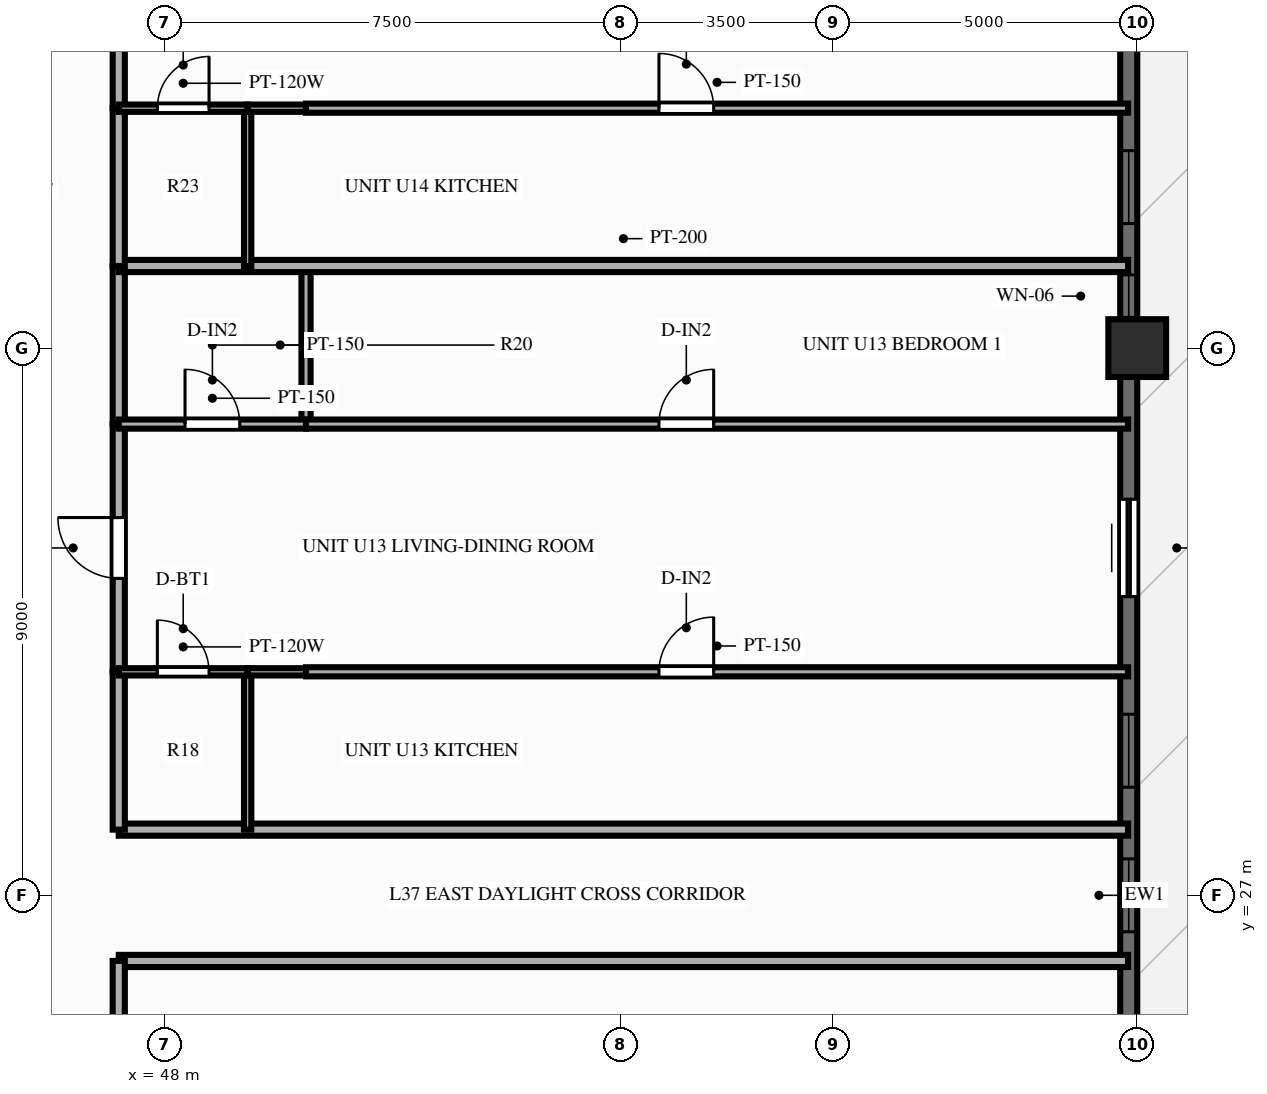
"""IFC4 building model, lengths in metres.
Left out: names, types, materials, properties, quantities, classifications, styles, units other than length and angle.
Written with IfcOpenShell. Run it as: python <this file> out.ifc"""

import sys

from ifc_helpers import new_model, si_unit, direction, frame, frame_2d, origin, origin_2d, place, context, subcontext, project, spatial, rectangle, extrude, source, transform, mapped, element, fill, save


model = new_model("IFC4")
c1 = context("Model", 3, precision=1e-05, world=origin(), true_north=direction((0.0, 1.0)))
c2 = subcontext(c1, "Body", "Model", "MODEL_VIEW")
j1 = project(units=[si_unit("LENGTHUNIT", "METRE"), si_unit("PLANEANGLEUNIT", "RADIAN")], contexts=[c1])
p1 = place(None, origin())
s1 = spatial("IfcSite", under=j1, at=p1, CompositionType="ELEMENT")
p2 = place(p1, origin())
s2 = spatial("IfcBuilding", under=s1, at=p2, CompositionType="ELEMENT")
p3 = place(p2, frame((0.0, 0.0, 116.85)))
s3 = spatial("IfcBuildingStorey", under=s2, at=p3, CompositionType="ELEMENT", Elevation=116.85)
m1 = source(origin(), c2, "Body", "SweptSolid", [
    extrude(rectangle(XDim=0.95, YDim=0.95, at=origin_2d()), origin(), (0.0, 0.0, 1.0), 3.0),
])
p4 = place(p3, frame((64.0, 36.0, 0.0), z_axis=(0.0, 0.0, 1.0), x_axis=(1.0, 0.0, 0.0)))
e1 = element("IfcColumn", 1, at=p4, inside=s3, PredefinedType="COLUMN", context=c2, shape_type="MappedRepresentation", body=[
    mapped(m1, transform((0.0, 0.0, 0.0), scale=1.0)),
])
p5 = place(p3, frame((63.86, 7.2, 0.0), z_axis=(0.0, 0.0, 1.0), x_axis=(0.0, 1.0, 0.0)))
e2 = element("IfcWall", 2, at=p5, inside=s3, PredefinedType="SOLIDWALL", context=c2, shape_type="SweptSolid", body=[
    extrude(rectangle(XDim=39.6, YDim=0.28, at=frame_2d((19.8, 0.0))), origin(), (0.0, 0.0, 1.0), 2.28),
])
p6 = place(p5, frame((1.56, 0.0, 0.25)))
e3 = element("IfcOpeningElement", 3, at=p6, cuts=e2, PredefinedType="OPENING", context=c2, shape_type="SweptSolid", body=[
    extrude(rectangle(XDim=1.2, YDim=1.5, at=frame_2d((0.6, 0.75))), frame((0.0, 0.152, 0.0), z_axis=(0.0, -1.0, 0.0), x_axis=(1.0, 0.0, 0.0)), (0.0, 0.0, 1.0), 0.304),
])
p7 = place(p5, frame((4.829, 0.0, 0.25)))
e4 = element("IfcOpeningElement", 4, at=p7, cuts=e2, PredefinedType="OPENING", context=c2, shape_type="SweptSolid", body=[
    extrude(rectangle(XDim=1.2, YDim=1.5, at=frame_2d((0.6, 0.75))), frame((0.0, 0.152, 0.0), z_axis=(0.0, -1.0, 0.0), x_axis=(1.0, 0.0, 0.0)), (0.0, 0.0, 1.0), 0.304),
])
p8 = place(p5, frame((7.567, 0.0, 0.25)))
e5 = element("IfcOpeningElement", 5, at=p8, cuts=e2, PredefinedType="OPENING", context=c2, shape_type="SweptSolid", body=[
    extrude(rectangle(XDim=1.2, YDim=1.5, at=frame_2d((0.6, 0.75))), frame((0.0, 0.152, 0.0), z_axis=(0.0, -1.0, 0.0), x_axis=(1.0, 0.0, 0.0)), (0.0, 0.0, 1.0), 0.304),
])
p9 = place(p5, frame((11.476, 0.0, 0.25)))
e6 = element("IfcOpeningElement", 6, at=p9, cuts=e2, PredefinedType="OPENING", context=c2, shape_type="SweptSolid", body=[
    extrude(rectangle(XDim=0.95, YDim=1.5, at=frame_2d((0.475, 0.75))), frame((0.0, 0.152, 0.0), z_axis=(0.0, -1.0, 0.0), x_axis=(1.0, 0.0, 0.0)), (0.0, 0.0, 1.0), 0.304),
])
p10 = place(p5, frame((13.552, 0.0, 0.25)))
e7 = element("IfcOpeningElement", 7, at=p10, cuts=e2, PredefinedType="OPENING", context=c2, shape_type="SweptSolid", body=[
    extrude(rectangle(XDim=1.2, YDim=1.5, at=frame_2d((0.6, 0.75))), frame((0.0, 0.152, 0.0), z_axis=(0.0, -1.0, 0.0), x_axis=(1.0, 0.0, 0.0)), (0.0, 0.0, 1.0), 0.304),
])
p11 = place(p5, frame((16.518, 0.0, 0.25)))
e8 = element("IfcOpeningElement", 8, at=p11, cuts=e2, PredefinedType="OPENING", context=c2, shape_type="SweptSolid", body=[
    extrude(rectangle(XDim=1.2, YDim=1.5, at=frame_2d((0.6, 0.75))), frame((0.0, 0.152, 0.0), z_axis=(0.0, -1.0, 0.0), x_axis=(1.0, 0.0, 0.0)), (0.0, 0.0, 1.0), 0.304),
])
p12 = place(p5, frame((19.2, 0.0, 0.25)))
e9 = element("IfcOpeningElement", 9, at=p12, cuts=e2, PredefinedType="OPENING", context=c2, shape_type="SweptSolid", body=[
    extrude(rectangle(XDim=1.2, YDim=1.5, at=frame_2d((0.6, 0.75))), frame((0.0, 0.152, 0.0), z_axis=(0.0, -1.0, 0.0), x_axis=(1.0, 0.0, 0.0)), (0.0, 0.0, 1.0), 0.304),
])
p13 = place(p5, frame((21.578, 0.0, 0.25)))
e10 = element("IfcOpeningElement", 10, at=p13, cuts=e2, PredefinedType="OPENING", context=c2, shape_type="SweptSolid", body=[
    extrude(rectangle(XDim=1.2, YDim=1.5, at=frame_2d((0.6, 0.75))), frame((0.0, 0.152, 0.0), z_axis=(0.0, -1.0, 0.0), x_axis=(1.0, 0.0, 0.0)), (0.0, 0.0, 1.0), 0.304),
])
p14 = place(p5, frame((26.313, 0.0, 0.0), z_axis=(0.0, 0.0, 1.0), x_axis=(-1.0, 0.0, 0.0)))
e11 = element("IfcOpeningElement", 11, at=p14, cuts=e2, PredefinedType="OPENING", context=c2, shape_type="SweptSolid", body=[
    extrude(rectangle(XDim=1.6, YDim=2.15, at=frame_2d((0.8, 1.075))), frame((0.0, 0.152, 0.0), z_axis=(0.0, -1.0, 0.0), x_axis=(1.0, 0.0, 0.0)), (0.0, 0.0, 1.0), 0.304),
])
p15 = place(p5, frame((29.305, 0.0, 0.25)))
e12 = element("IfcOpeningElement", 12, at=p15, cuts=e2, PredefinedType="OPENING", context=c2, shape_type="SweptSolid", body=[
    extrude(rectangle(XDim=0.7, YDim=1.5, at=frame_2d((0.35, 0.75))), frame((0.0, 0.152, 0.0), z_axis=(0.0, -1.0, 0.0), x_axis=(1.0, 0.0, 0.0)), (0.0, 0.0, 1.0), 0.304),
])
p16 = place(p5, frame((30.848, 0.0, 0.25)))
e13 = element("IfcOpeningElement", 13, at=p16, cuts=e2, PredefinedType="OPENING", context=c2, shape_type="SweptSolid", body=[
    extrude(rectangle(XDim=1.2, YDim=1.5, at=frame_2d((0.6, 0.75))), frame((0.0, 0.152, 0.0), z_axis=(0.0, -1.0, 0.0), x_axis=(1.0, 0.0, 0.0)), (0.0, 0.0, 1.0), 0.304),
])
p17 = place(p5, frame((34.183, 0.0, 0.25)))
e14 = element("IfcOpeningElement", 14, at=p17, cuts=e2, PredefinedType="OPENING", context=c2, shape_type="SweptSolid", body=[
    extrude(rectangle(XDim=1.2, YDim=1.5, at=frame_2d((0.6, 0.75))), frame((0.0, 0.152, 0.0), z_axis=(0.0, -1.0, 0.0), x_axis=(1.0, 0.0, 0.0)), (0.0, 0.0, 1.0), 0.304),
])
p18 = place(p5, frame((37.452, 0.0, 0.25)))
e15 = element("IfcOpeningElement", 15, at=p18, cuts=e2, PredefinedType="OPENING", context=c2, shape_type="SweptSolid", body=[
    extrude(rectangle(XDim=1.2, YDim=1.5, at=frame_2d((0.6, 0.75))), frame((0.0, 0.152, 0.0), z_axis=(0.0, -1.0, 0.0), x_axis=(1.0, 0.0, 0.0)), (0.0, 0.0, 1.0), 0.304),
])
p19 = place(p3, frame((47.25, 25.92, 0.0), z_axis=(0.0, 0.0, 1.0), x_axis=(1.0, 0.0, 0.0)))
e16 = element("IfcWall", 16, at=p19, inside=s3, PredefinedType="PARTITIONING", context=c2, shape_type="SweptSolid", body=[
    extrude(rectangle(XDim=16.6, YDim=0.2, at=frame_2d((8.3, 0.0))), origin(), (0.0, 0.0, 1.0), 2.79),
])
p20 = place(p3, frame((47.25, 22.716, 0.0), z_axis=(0.0, 0.0, 1.0), x_axis=(0.0, 1.0, 0.0)))
e17 = element("IfcWall", 17, at=p20, inside=s3, PredefinedType="PARTITIONING", context=c2, shape_type="SweptSolid", body=[
    extrude(rectangle(XDim=3.204, YDim=0.2, at=frame_2d((1.602, 0.0))), origin(), (0.0, 0.0, 1.0), 2.79),
])
p21 = place(p20, frame((1.102, 0.0, 0.0)))
e18 = element("IfcOpeningElement", 18, at=p21, cuts=e17, PredefinedType="OPENING", context=c2, shape_type="SweptSolid", body=[
    extrude(rectangle(XDim=1.0, YDim=2.15, at=frame_2d((0.5, 1.075))), frame((0.0, 0.112, 0.0), z_axis=(0.0, -1.0, 0.0), x_axis=(1.0, 0.0, 0.0)), (0.0, 0.0, 1.0), 0.224),
])
p22 = place(p3, frame((47.25, 28.08, 0.0), z_axis=(0.0, 0.0, 1.0), x_axis=(1.0, 0.0, 0.0)))
e19 = element("IfcWall", 19, at=p22, inside=s3, PredefinedType="PARTITIONING", context=c2, shape_type="SweptSolid", body=[
    extrude(rectangle(XDim=16.6, YDim=0.2, at=frame_2d((8.3, 0.0))), origin(), (0.0, 0.0, 1.0), 2.79),
])
p23 = place(p3, frame((47.25, 28.08, 0.0), z_axis=(0.0, 0.0, 1.0), x_axis=(0.0, 1.0, 0.0)))
e20 = element("IfcWall", 20, at=p23, inside=s3, PredefinedType="PARTITIONING", context=c2, shape_type="SweptSolid", body=[
    extrude(rectangle(XDim=2.595, YDim=0.2, at=frame_2d((1.298, 0.0))), origin(), (0.0, 0.0, 1.0), 2.79),
])
p24 = place(p3, frame((47.25, 30.676, 0.0), z_axis=(0.0, 0.0, 1.0), x_axis=(0.0, 1.0, 0.0)))
e21 = element("IfcWall", 21, at=p24, inside=s3, PredefinedType="PARTITIONING", context=c2, shape_type="SweptSolid", body=[
    extrude(rectangle(XDim=4.074, YDim=0.2, at=frame_2d((2.037, 0.0))), origin(), (0.0, 0.0, 1.0), 2.79),
])
p25 = place(p24, frame((1.537, 0.0, 0.0)))
e22 = element("IfcOpeningElement", 22, at=p25, cuts=e21, PredefinedType="OPENING", context=c2, shape_type="SweptSolid", body=[
    extrude(rectangle(XDim=1.0, YDim=2.15, at=frame_2d((0.5, 1.075))), frame((0.0, 0.112, 0.0), z_axis=(0.0, -1.0, 0.0), x_axis=(1.0, 0.0, 0.0)), (0.0, 0.0, 1.0), 0.224),
])
p26 = place(p3, frame((47.25, 34.75, 0.0), z_axis=(0.0, 0.0, 1.0), x_axis=(0.0, 1.0, 0.0)))
e23 = element("IfcWall", 23, at=p26, inside=s3, PredefinedType="PARTITIONING", context=c2, shape_type="SweptSolid", body=[
    extrude(rectangle(XDim=2.6, YDim=0.2, at=frame_2d((1.3, 0.0))), origin(), (0.0, 0.0, 1.0), 2.79),
])
p27 = place(p3, frame((49.37, 28.08, 0.0), z_axis=(0.0, 0.0, 1.0), x_axis=(0.0, 1.0, 0.0)))
e24 = element("IfcWall", 24, at=p27, inside=s3, PredefinedType="PARTITIONING", context=c2, shape_type="SweptSolid", body=[
    extrude(rectangle(XDim=2.595, YDim=0.12, at=frame_2d((1.298, 0.0))), origin(), (0.0, 0.0, 1.0), 2.79),
])
p28 = place(p3, frame((50.33, 34.75, 0.0), z_axis=(0.0, 0.0, 1.0), x_axis=(0.0, 1.0, 0.0)))
e25 = element("IfcWall", 25, at=p28, inside=s3, PredefinedType="PARTITIONING", context=c2, shape_type="SweptSolid", body=[
    extrude(rectangle(XDim=2.6, YDim=0.15, at=frame_2d((1.3, 0.0))), origin(), (0.0, 0.0, 1.0), 2.79),
])
p29 = place(p3, frame((47.25, 30.676, 0.0), z_axis=(0.0, 0.0, 1.0), x_axis=(1.0, 0.0, 0.0)))
e26 = element("IfcWall", 26, at=p29, inside=s3, PredefinedType="PARTITIONING", context=c2, shape_type="SweptSolid", body=[
    extrude(rectangle(XDim=2.12, YDim=0.12, at=frame_2d((1.06, 0.0))), origin(), (0.0, 0.0, 1.0), 2.79),
])
p30 = place(p29, frame((0.635, 0.0, 0.0)))
e27 = element("IfcOpeningElement", 27, at=p30, cuts=e26, PredefinedType="OPENING", context=c2, shape_type="SweptSolid", body=[
    extrude(rectangle(XDim=0.85, YDim=2.05, at=frame_2d((0.425, 1.025))), frame((0.0, 0.072, 0.0), z_axis=(0.0, -1.0, 0.0), x_axis=(1.0, 0.0, 0.0)), (0.0, 0.0, 1.0), 0.144),
])
p31 = place(p3, frame((49.37, 30.676, 0.0), z_axis=(0.0, 0.0, 1.0), x_axis=(1.0, 0.0, 0.0)))
e28 = element("IfcWall", 28, at=p31, inside=s3, PredefinedType="PARTITIONING", context=c2, shape_type="SweptSolid", body=[
    extrude(rectangle(XDim=0.96, YDim=0.12, at=frame_2d((0.48, 0.0))), origin(), (0.0, 0.0, 1.0), 2.79),
])
p32 = place(p3, frame((50.33, 30.676, 0.0), z_axis=(0.0, 0.0, 1.0), x_axis=(1.0, 0.0, 0.0)))
e29 = element("IfcWall", 29, at=p32, inside=s3, PredefinedType="PARTITIONING", context=c2, shape_type="SweptSolid", body=[
    extrude(rectangle(XDim=13.52, YDim=0.15, at=frame_2d((6.76, 0.0))), origin(), (0.0, 0.0, 1.0), 2.79),
])
p33 = place(p32, frame((5.804, 0.0, 0.0)))
e30 = element("IfcOpeningElement", 30, at=p33, cuts=e29, PredefinedType="OPENING", context=c2, shape_type="SweptSolid", body=[
    extrude(rectangle(XDim=0.9, YDim=2.1, at=frame_2d((0.45, 1.05))), frame((0.0, 0.087, 0.0), z_axis=(0.0, -1.0, 0.0), x_axis=(1.0, 0.0, 0.0)), (0.0, 0.0, 1.0), 0.174),
])
p34 = place(p3, frame((47.25, 34.75, 0.0), z_axis=(0.0, 0.0, 1.0), x_axis=(1.0, 0.0, 0.0)))
e31 = element("IfcWall", 31, at=p34, inside=s3, PredefinedType="PARTITIONING", context=c2, shape_type="SweptSolid", body=[
    extrude(rectangle(XDim=3.08, YDim=0.15, at=frame_2d((1.54, 0.0))), origin(), (0.0, 0.0, 1.0), 2.79),
])
p35 = place(p34, frame((1.09, 0.0, 0.0)))
e32 = element("IfcOpeningElement", 32, at=p35, cuts=e31, PredefinedType="OPENING", context=c2, shape_type="SweptSolid", body=[
    extrude(rectangle(XDim=0.9, YDim=2.1, at=frame_2d((0.45, 1.05))), frame((0.0, 0.087, 0.0), z_axis=(0.0, -1.0, 0.0), x_axis=(1.0, 0.0, 0.0)), (0.0, 0.0, 1.0), 0.174),
])
p36 = place(p3, frame((50.33, 34.75, 0.0), z_axis=(0.0, 0.0, 1.0), x_axis=(1.0, 0.0, 0.0)))
e33 = element("IfcWall", 33, at=p36, inside=s3, PredefinedType="PARTITIONING", context=c2, shape_type="SweptSolid", body=[
    extrude(rectangle(XDim=13.52, YDim=0.15, at=frame_2d((6.76, 0.0))), origin(), (0.0, 0.0, 1.0), 2.79),
])
p37 = place(p36, frame((5.804, 0.0, 0.0)))
e34 = element("IfcOpeningElement", 34, at=p37, cuts=e33, PredefinedType="OPENING", context=c2, shape_type="SweptSolid", body=[
    extrude(rectangle(XDim=0.9, YDim=2.1, at=frame_2d((0.45, 1.05))), frame((0.0, 0.087, 0.0), z_axis=(0.0, -1.0, 0.0), x_axis=(1.0, 0.0, 0.0)), (0.0, 0.0, 1.0), 0.174),
])
p38 = place(p3, frame((47.25, 37.35, 0.0), z_axis=(0.0, 0.0, 1.0), x_axis=(1.0, 0.0, 0.0)))
e35 = element("IfcWall", 35, at=p38, inside=s3, PredefinedType="PARTITIONING", context=c2, shape_type="SweptSolid", body=[
    extrude(rectangle(XDim=16.6, YDim=0.2, at=frame_2d((8.3, 0.0))), origin(), (0.0, 0.0, 1.0), 2.79),
])
p39 = place(p3, frame((47.25, 37.35, 0.0), z_axis=(0.0, 0.0, 1.0), x_axis=(0.0, 1.0, 0.0)))
e36 = element("IfcWall", 36, at=p39, inside=s3, PredefinedType="PARTITIONING", context=c2, shape_type="SweptSolid", body=[
    extrude(rectangle(XDim=2.595, YDim=0.2, at=frame_2d((1.298, 0.0))), origin(), (0.0, 0.0, 1.0), 2.79),
])
p40 = place(p3, frame((47.25, 39.946, 0.0), z_axis=(0.0, 0.0, 1.0), x_axis=(0.0, 1.0, 0.0)))
e37 = element("IfcWall", 37, at=p40, inside=s3, PredefinedType="PARTITIONING", context=c2, shape_type="SweptSolid", body=[
    extrude(rectangle(XDim=4.074, YDim=0.2, at=frame_2d((2.037, 0.0))), origin(), (0.0, 0.0, 1.0), 2.79),
])
p41 = place(p40, frame((1.537, 0.0, 0.0)))
e38 = element("IfcOpeningElement", 38, at=p41, cuts=e37, PredefinedType="OPENING", context=c2, shape_type="SweptSolid", body=[
    extrude(rectangle(XDim=1.0, YDim=2.15, at=frame_2d((0.5, 1.075))), frame((0.0, 0.112, 0.0), z_axis=(0.0, -1.0, 0.0), x_axis=(1.0, 0.0, 0.0)), (0.0, 0.0, 1.0), 0.224),
])
p42 = place(p3, frame((49.37, 37.35, 0.0), z_axis=(0.0, 0.0, 1.0), x_axis=(0.0, 1.0, 0.0)))
e39 = element("IfcWall", 39, at=p42, inside=s3, PredefinedType="PARTITIONING", context=c2, shape_type="SweptSolid", body=[
    extrude(rectangle(XDim=2.595, YDim=0.12, at=frame_2d((1.298, 0.0))), origin(), (0.0, 0.0, 1.0), 2.79),
])
p43 = place(p3, frame((47.25, 39.946, 0.0), z_axis=(0.0, 0.0, 1.0), x_axis=(1.0, 0.0, 0.0)))
e40 = element("IfcWall", 40, at=p43, inside=s3, PredefinedType="PARTITIONING", context=c2, shape_type="SweptSolid", body=[
    extrude(rectangle(XDim=2.12, YDim=0.12, at=frame_2d((1.06, 0.0))), origin(), (0.0, 0.0, 1.0), 2.79),
])
p44 = place(p43, frame((0.635, 0.0, 0.0)))
e41 = element("IfcOpeningElement", 41, at=p44, cuts=e40, PredefinedType="OPENING", context=c2, shape_type="SweptSolid", body=[
    extrude(rectangle(XDim=0.85, YDim=2.05, at=frame_2d((0.425, 1.025))), frame((0.0, 0.072, 0.0), z_axis=(0.0, -1.0, 0.0), x_axis=(1.0, 0.0, 0.0)), (0.0, 0.0, 1.0), 0.144),
])
p45 = place(p3, frame((49.37, 39.946, 0.0), z_axis=(0.0, 0.0, 1.0), x_axis=(1.0, 0.0, 0.0)))
e42 = element("IfcWall", 42, at=p45, inside=s3, PredefinedType="PARTITIONING", context=c2, shape_type="SweptSolid", body=[
    extrude(rectangle(XDim=0.96, YDim=0.12, at=frame_2d((0.48, 0.0))), origin(), (0.0, 0.0, 1.0), 2.79),
])
p46 = place(p3, frame((50.33, 39.946, 0.0), z_axis=(0.0, 0.0, 1.0), x_axis=(1.0, 0.0, 0.0)))
e43 = element("IfcWall", 43, at=p46, inside=s3, PredefinedType="PARTITIONING", context=c2, shape_type="SweptSolid", body=[
    extrude(rectangle(XDim=13.52, YDim=0.15, at=frame_2d((6.76, 0.0))), origin(), (0.0, 0.0, 1.0), 2.79),
])
p47 = place(p46, frame((5.804, 0.0, 0.0)))
e44 = element("IfcOpeningElement", 44, at=p47, cuts=e43, PredefinedType="OPENING", context=c2, shape_type="SweptSolid", body=[
    extrude(rectangle(XDim=0.9, YDim=2.1, at=frame_2d((0.45, 1.05))), frame((0.0, 0.087, 0.0), z_axis=(0.0, -1.0, 0.0), x_axis=(1.0, 0.0, 0.0)), (0.0, 0.0, 1.0), 0.174),
])
m2 = source(origin(), c2, "Body", "SweptSolid", [
    extrude(rectangle(XDim=1.2, YDim=1.5, at=frame_2d((0.6, 0.75))), frame((0.0, 0.03, 0.0), z_axis=(0.0, -1.0, 0.0), x_axis=(1.0, 0.0, 0.0)), (0.0, 0.0, 1.0), 0.06),
])
p48 = place(p12, origin())
e45 = element("IfcWindow", 45, at=p48, inside=s3, PartitioningType="SINGLE_PANEL", PredefinedType="WINDOW", context=c2, shape_type="MappedRepresentation", body=[
    mapped(m2, transform((0.0, 0.0, 0.0), scale=1.0)),
])
fill(e9, e45)
p49 = place(p13, origin())
e46 = element("IfcWindow", 46, at=p49, inside=s3, PartitioningType="SINGLE_PANEL", PredefinedType="WINDOW", context=c2, shape_type="MappedRepresentation", body=[
    mapped(m2, transform((0.0, 0.0, 0.0), scale=1.0)),
])
fill(e10, e46)
m3 = source(origin(), c2, "Body", "SweptSolid", [
    extrude(rectangle(XDim=1.6, YDim=2.15, at=frame_2d((0.8, 1.075))), frame((0.0, 0.025, 0.0), z_axis=(0.0, -1.0, 0.0), x_axis=(1.0, 0.0, 0.0)), (0.0, 0.0, 1.0), 0.05),
])
p50 = place(p14, origin())
e47 = element("IfcDoor", 47, at=p50, inside=s3, OperationType="SLIDING_TO_LEFT", PredefinedType="DOOR", context=c2, shape_type="MappedRepresentation", body=[
    mapped(m3, transform((0.0, 0.0, 0.0), scale=1.0)),
])
fill(e11, e47)
m4 = source(origin(), c2, "Body", "SweptSolid", [
    extrude(rectangle(XDim=0.7, YDim=1.5, at=frame_2d((0.35, 0.75))), frame((0.0, 0.03, 0.0), z_axis=(0.0, -1.0, 0.0), x_axis=(1.0, 0.0, 0.0)), (0.0, 0.0, 1.0), 0.06),
])
p51 = place(p15, origin())
e48 = element("IfcWindow", 48, at=p51, inside=s3, PartitioningType="SINGLE_PANEL", PredefinedType="WINDOW", context=c2, shape_type="MappedRepresentation", body=[
    mapped(m4, transform((0.0, 0.0, 0.0), scale=1.0)),
])
fill(e12, e48)
p52 = place(p16, origin())
e49 = element("IfcWindow", 49, at=p52, inside=s3, PartitioningType="SINGLE_PANEL", PredefinedType="WINDOW", context=c2, shape_type="MappedRepresentation", body=[
    mapped(m2, transform((0.0, 0.0, 0.0), scale=1.0)),
])
fill(e13, e49)
m5 = source(origin(), c2, "Body", "SweptSolid", [
    extrude(rectangle(XDim=1.0, YDim=2.15, at=frame_2d((0.5, 1.075))), frame((0.0, 0.025, 0.0), z_axis=(0.0, -1.0, 0.0), x_axis=(1.0, 0.0, 0.0)), (0.0, 0.0, 1.0), 0.05),
])
p53 = place(p25, origin())
e50 = element("IfcDoor", 50, at=p53, inside=s3, OperationType="SINGLE_SWING_RIGHT", PredefinedType="DOOR", context=c2, shape_type="MappedRepresentation", body=[
    mapped(m5, transform((0.0, 0.0, 0.0), scale=1.0)),
])
fill(e22, e50)
m6 = source(origin(), c2, "Body", "SweptSolid", [
    extrude(rectangle(XDim=0.85, YDim=2.05, at=frame_2d((0.425, 1.025))), frame((0.0, 0.025, 0.0), z_axis=(0.0, -1.0, 0.0), x_axis=(1.0, 0.0, 0.0)), (0.0, 0.0, 1.0), 0.05),
])
p54 = place(p30, origin())
e51 = element("IfcDoor", 51, at=p54, inside=s3, OperationType="SINGLE_SWING_LEFT", PredefinedType="DOOR", context=c2, shape_type="MappedRepresentation", body=[
    mapped(m6, transform((0.0, 0.0, 0.0), scale=1.0)),
])
fill(e27, e51)
m7 = source(origin(), c2, "Body", "SweptSolid", [
    extrude(rectangle(XDim=0.9, YDim=2.1, at=frame_2d((0.45, 1.05))), frame((0.0, 0.025, 0.0), z_axis=(0.0, -1.0, 0.0), x_axis=(1.0, 0.0, 0.0)), (0.0, 0.0, 1.0), 0.05),
])
p55 = place(p33, origin())
e52 = element("IfcDoor", 52, at=p55, inside=s3, OperationType="SINGLE_SWING_RIGHT", PredefinedType="DOOR", context=c2, shape_type="MappedRepresentation", body=[
    mapped(m7, transform((0.0, 0.0, 0.0), scale=1.0)),
])
fill(e30, e52)
p56 = place(p35, origin())
e53 = element("IfcDoor", 53, at=p56, inside=s3, OperationType="SINGLE_SWING_LEFT", PredefinedType="DOOR", context=c2, shape_type="MappedRepresentation", body=[
    mapped(m7, transform((0.0, 0.0, 0.0), scale=1.0)),
])
fill(e32, e53)
p57 = place(p37, origin())
e54 = element("IfcDoor", 54, at=p57, inside=s3, OperationType="SINGLE_SWING_RIGHT", PredefinedType="DOOR", context=c2, shape_type="MappedRepresentation", body=[
    mapped(m7, transform((0.0, 0.0, 0.0), scale=1.0)),
])
fill(e34, e54)
p58 = place(p44, origin())
e55 = element("IfcDoor", 55, at=p58, inside=s3, OperationType="SINGLE_SWING_RIGHT", PredefinedType="DOOR", context=c2, shape_type="MappedRepresentation", body=[
    mapped(m6, transform((0.0, 0.0, 0.0), scale=1.0)),
])
fill(e41, e55)
p59 = place(p47, origin())
e56 = element("IfcDoor", 56, at=p59, inside=s3, OperationType="SINGLE_SWING_LEFT", PredefinedType="DOOR", context=c2, shape_type="MappedRepresentation", body=[
    mapped(m7, transform((0.0, 0.0, 0.0), scale=1.0)),
])
fill(e44, e56)
save(model, sys.argv[1])
